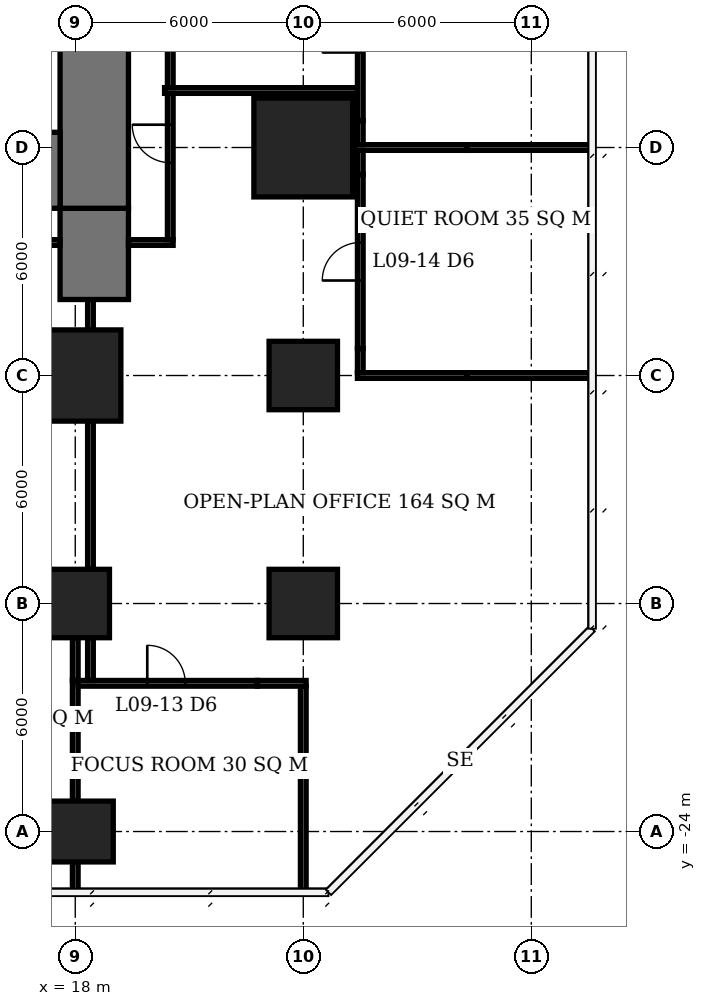
"""IFC4 building model, lengths in metres.
Left out: names, types, materials, properties, quantities, classifications, styles, units other than length and angle.
Written with IfcOpenShell. Run it as: python <this file> out.ifc"""

import sys

from ifc_helpers import new_model, si_unit, direction, frame, frame_2d, origin, origin_2d, place, context, subcontext, project, spatial, rectangle, extrude, element, fill, save


model = new_model("IFC4")
c1 = context("Model", 3, precision=1e-05, world=origin(), true_north=direction((0.0, 1.0)))
c2 = subcontext(c1, "Body", "Model", "MODEL_VIEW")
j1 = project(units=[si_unit("LENGTHUNIT", "METRE"), si_unit("PLANEANGLEUNIT", "RADIAN")], contexts=[c1])
p1 = place(None, origin())
s1 = spatial("IfcSite", under=j1, at=p1, CompositionType="ELEMENT")
p2 = place(p1, origin())
s2 = spatial("IfcBuilding", under=s1, at=p2, CompositionType="ELEMENT")
p3 = place(p2, frame((0.0, 0.0, 41.6)))
s3 = spatial("IfcBuildingStorey", under=s2, at=p3, CompositionType="ELEMENT", Elevation=41.6)
p4 = place(p3, frame((18.0, -24.0, 0.0), z_axis=(0.0, 0.0, 1.0), x_axis=(1.0, 0.0, 0.0)))
e1 = element("IfcColumn", 1, at=p4, inside=s3, PredefinedType="COLUMN", context=c2, shape_type="SweptSolid", body=[
    extrude(rectangle(XDim=2.0, YDim=1.6, at=origin_2d()), origin(), (0.0, 0.0, 1.0), 3.9),
])
p5 = place(p3, frame((18.0, -18.0, 0.0), z_axis=(0.0, 0.0, 1.0), x_axis=(1.0, 0.0, 0.0)))
e2 = element("IfcColumn", 2, at=p5, inside=s3, PredefinedType="COLUMN", context=c2, shape_type="SweptSolid", body=[
    extrude(rectangle(XDim=1.8, YDim=1.8, at=origin_2d()), origin(), (0.0, 0.0, 1.0), 3.9),
])
p6 = place(p3, frame((18.0, -12.0, 0.0), z_axis=(0.0, 0.0, 1.0), x_axis=(1.0, 0.0, 0.0)))
e3 = element("IfcColumn", 3, at=p6, inside=s3, PredefinedType="COLUMN", context=c2, shape_type="SweptSolid", body=[
    extrude(rectangle(XDim=2.4, YDim=2.4, at=origin_2d()), origin(), (0.0, 0.0, 1.0), 3.9),
])
for number, where, z_axis, x_axis in (
    (4, (24.0, -18.0, 0.0), (0.0, 0.0, 1.0), (1.0, 0.0, 0.0)),
    (5, (24.0, -12.0, 0.0), (0.0, 0.0, 1.0), (1.0, 0.0, 0.0)),
):
    element("IfcColumn", number, at=place(p3, frame(where, z_axis=z_axis, x_axis=x_axis)), inside=s3, PredefinedType="COLUMN", context=c2, shape_type="SweptSolid", body=[
        extrude(rectangle(XDim=1.8, YDim=1.8, at=origin_2d()), origin(), (0.0, 0.0, 1.0), 3.9),
    ])
p7 = place(p3, frame((24.0, -6.0, 0.0), z_axis=(0.0, 0.0, 1.0), x_axis=(1.0, 0.0, 0.0)))
e6 = element("IfcColumn", 6, at=p7, inside=s3, PredefinedType="COLUMN", context=c2, shape_type="SweptSolid", body=[
    extrude(rectangle(XDim=2.6, YDim=2.6, at=origin_2d()), origin(), (0.0, 0.0, 1.0), 3.9),
])
p8 = place(p3, frame((-5.6, -6.6, 0.0), z_axis=(0.0, 0.0, 1.0), x_axis=(1.0, 0.0, 0.0)))
e7 = element("IfcWall", 7, at=p8, inside=s3, PredefinedType="SHEAR", context=c2, shape_type="SweptSolid", body=[
    extrude(rectangle(XDim=23.2, YDim=2.0, at=frame_2d((11.6, 0.0))), origin(), (0.0, 0.0, 1.0), 3.9),
])
p9 = place(p3, frame((18.5, -7.6, 0.0), z_axis=(0.0, 0.0, 1.0), x_axis=(0.0, 1.0, 0.0)))
e8 = element("IfcWall", 8, at=p9, inside=s3, PredefinedType="SHEAR", context=c2, shape_type="SweptSolid", body=[
    extrude(rectangle(XDim=21.2, YDim=1.8, at=frame_2d((10.6, 0.0))), origin(), (0.0, 0.0, 1.0), 3.9),
])
p10 = place(p9, frame((9.2, 0.0, 0.0)))
e9 = element("IfcOpeningElement", 9, at=p10, cuts=e8, PredefinedType="OPENING", context=c2, shape_type="SweptSolid", body=[
    extrude(rectangle(XDim=1.8, YDim=2.4, at=frame_2d((0.9, 1.2))), frame((0.0, 0.91, 0.0), z_axis=(0.0, -1.0, 0.0), x_axis=(1.0, 0.0, 0.0)), (0.0, 0.0, 1.0), 1.82),
])
p11 = place(p3, frame((18.5, -10.0, 0.0), z_axis=(0.0, 0.0, 1.0), x_axis=(0.0, 1.0, 0.0)))
e10 = element("IfcWall", 10, at=p11, inside=s3, PredefinedType="SHEAR", context=c2, shape_type="SweptSolid", body=[
    extrude(rectangle(XDim=2.4, YDim=1.8, at=frame_2d((1.2, 0.0))), origin(), (0.0, 0.0, 1.0), 3.9),
])
p12 = place(p3, frame((18.075, -20.1, 0.0), z_axis=(0.0, 0.0, 1.0), x_axis=(1.0, 0.0, 0.0)))
e11 = element("IfcWall", 11, at=p12, inside=s3, PredefinedType="PARTITIONING", context=c2, shape_type="SweptSolid", body=[
    extrude(rectangle(XDim=4.715, YDim=0.15, at=frame_2d((2.357, 0.0))), origin(), (0.0, 0.0, 1.0), 3.65),
])
p13 = place(p12, frame((1.82, 0.0, 0.0)))
e12 = element("IfcOpeningElement", 12, at=p13, cuts=e11, PredefinedType="OPENING", context=c2, shape_type="SweptSolid", body=[
    extrude(rectangle(XDim=1.0, YDim=2.1, at=frame_2d((0.5, 1.05))), frame((0.0, 0.085, 0.0), z_axis=(0.0, -1.0, 0.0), x_axis=(1.0, 0.0, 0.0)), (0.0, 0.0, 1.0), 0.17),
])
p14 = place(p3, frame((22.79, -20.1, 0.0), z_axis=(0.0, 0.0, 1.0), x_axis=(1.0, 0.0, 0.0)))
e13 = element("IfcWall", 13, at=p14, inside=s3, PredefinedType="PARTITIONING", context=c2, shape_type="SweptSolid", body=[
    extrude(rectangle(XDim=1.285, YDim=0.15, at=frame_2d((0.643, 0.0))), origin(), (0.0, 0.0, 1.0), 2.65),
])
p15 = place(p3, frame((25.425, -12.0, 0.0), z_axis=(0.0, 0.0, 1.0), x_axis=(1.0, 0.0, 0.0)))
e14 = element("IfcWall", 14, at=p15, inside=s3, PredefinedType="PARTITIONING", context=c2, shape_type="SweptSolid", body=[
    extrude(rectangle(XDim=2.885, YDim=0.15, at=frame_2d((1.442, 0.0))), origin(), (0.0, 0.0, 1.0), 2.65),
])
p16 = place(p3, frame((28.31, -12.0, 0.0), z_axis=(0.0, 0.0, 1.0), x_axis=(1.0, 0.0, 0.0)))
e15 = element("IfcWall", 15, at=p16, inside=s3, PredefinedType="PARTITIONING", context=c2, shape_type="SweptSolid", body=[
    extrude(rectangle(XDim=3.29, YDim=0.15, at=frame_2d((1.645, 0.0))), origin(), (0.0, 0.0, 1.0), 3.65),
])
p17 = place(p3, frame((25.35, -6.0, 0.0), z_axis=(0.0, 0.0, 1.0), x_axis=(1.0, 0.0, 0.0)))
e16 = element("IfcWall", 16, at=p17, inside=s3, PredefinedType="PARTITIONING", context=c2, shape_type="SweptSolid", body=[
    extrude(rectangle(XDim=2.96, YDim=0.15, at=frame_2d((1.48, 0.0))), origin(), (0.0, 0.0, 1.0), 2.65),
])
p18 = place(p3, frame((28.31, -6.0, 0.0), z_axis=(0.0, 0.0, 1.0), x_axis=(1.0, 0.0, 0.0)))
e17 = element("IfcWall", 17, at=p18, inside=s3, PredefinedType="PARTITIONING", context=c2, shape_type="SweptSolid", body=[
    extrude(rectangle(XDim=3.29, YDim=0.15, at=frame_2d((1.645, 0.0))), origin(), (0.0, 0.0, 1.0), 3.65),
])
p19 = place(p3, frame((18.0, -25.6, 0.0), z_axis=(0.0, 0.0, 1.0), x_axis=(0.0, 1.0, 0.0)))
e18 = element("IfcWall", 18, at=p19, inside=s3, PredefinedType="PARTITIONING", context=c2, shape_type="SweptSolid", body=[
    extrude(rectangle(XDim=0.8, YDim=0.15, at=frame_2d((0.4, 0.0))), origin(), (0.0, 0.0, 1.0), 3.65),
])
p20 = place(p3, frame((18.0, -23.2, 0.0), z_axis=(0.0, 0.0, 1.0), x_axis=(0.0, 1.0, 0.0)))
e19 = element("IfcWall", 19, at=p20, inside=s3, PredefinedType="PARTITIONING", context=c2, shape_type="SweptSolid", body=[
    extrude(rectangle(XDim=3.175, YDim=0.15, at=frame_2d((1.587, 0.0))), origin(), (0.0, 0.0, 1.0), 3.65),
])
p21 = place(p3, frame((18.0, -20.025, 0.0), z_axis=(0.0, 0.0, 1.0), x_axis=(0.0, 1.0, 0.0)))
e20 = element("IfcWall", 20, at=p21, inside=s3, PredefinedType="PARTITIONING", context=c2, shape_type="SweptSolid", body=[
    extrude(rectangle(XDim=1.125, YDim=0.15, at=frame_2d((0.562, 0.0))), origin(), (0.0, 0.0, 1.0), 3.65),
])
p22 = place(p3, frame((24.0, -25.6, 0.0), z_axis=(0.0, 0.0, 1.0), x_axis=(0.0, 1.0, 0.0)))
e21 = element("IfcWall", 21, at=p22, inside=s3, PredefinedType="PARTITIONING", context=c2, shape_type="SweptSolid", body=[
    extrude(rectangle(XDim=3.555, YDim=0.15, at=frame_2d((1.778, 0.0))), origin(), (0.0, 0.0, 1.0), 3.65),
])
p23 = place(p3, frame((24.0, -22.045, 0.0), z_axis=(0.0, 0.0, 1.0), x_axis=(0.0, 1.0, 0.0)))
e22 = element("IfcWall", 22, at=p23, inside=s3, PredefinedType="PARTITIONING", context=c2, shape_type="SweptSolid", body=[
    extrude(rectangle(XDim=1.87, YDim=0.15, at=frame_2d((0.935, 0.0))), origin(), (0.0, 0.0, 1.0), 2.65),
])
p24 = place(p3, frame((25.5, -11.925, 0.0), z_axis=(0.0, 0.0, 1.0), x_axis=(0.0, 1.0, 0.0)))
e23 = element("IfcWall", 23, at=p24, inside=s3, PredefinedType="PARTITIONING", context=c2, shape_type="SweptSolid", body=[
    extrude(rectangle(XDim=0.635, YDim=0.15, at=frame_2d((0.317, 0.0))), origin(), (0.0, 0.0, 1.0), 2.65),
])
p25 = place(p3, frame((25.5, -11.29, 0.0), z_axis=(0.0, 0.0, 1.0), x_axis=(0.0, 1.0, 0.0)))
e24 = element("IfcWall", 24, at=p25, inside=s3, PredefinedType="PARTITIONING", context=c2, shape_type="SweptSolid", body=[
    extrude(rectangle(XDim=4.58, YDim=0.15, at=frame_2d((2.29, 0.0))), origin(), (0.0, 0.0, 1.0), 3.65),
])
p26 = place(p25, frame((1.79, 0.0, 0.0)))
e25 = element("IfcOpeningElement", 25, at=p26, cuts=e24, PredefinedType="OPENING", context=c2, shape_type="SweptSolid", body=[
    extrude(rectangle(XDim=1.0, YDim=2.1, at=frame_2d((0.5, 1.05))), frame((0.0, 0.085, 0.0), z_axis=(0.0, -1.0, 0.0), x_axis=(1.0, 0.0, 0.0)), (0.0, 0.0, 1.0), 0.17),
])
for number, where, z_axis, x_axis in (
    (26, (25.5, -6.71, 0.0), (0.0, 0.0, 1.0), (0.0, 1.0, 0.0)),
    (27, (25.5, -5.925, 0.0), (0.0, 0.0, 1.0), (0.0, 1.0, 0.0)),
):
    element("IfcWall", number, at=place(p3, frame(where, z_axis=z_axis, x_axis=x_axis)), inside=s3, PredefinedType="PARTITIONING", context=c2, shape_type="SweptSolid", body=[
        extrude(rectangle(XDim=0.635, YDim=0.15, at=frame_2d((0.317, 0.0))), origin(), (0.0, 0.0, 1.0), 2.65),
    ])
p27 = place(p3, frame((25.5, -5.29, 0.0), z_axis=(0.0, 0.0, 1.0), x_axis=(0.0, 1.0, 0.0)))
e28 = element("IfcWall", 28, at=p27, inside=s3, PredefinedType="PARTITIONING", context=c2, shape_type="SweptSolid", body=[
    extrude(rectangle(XDim=4.58, YDim=0.15, at=frame_2d((2.29, 0.0))), origin(), (0.0, 0.0, 1.0), 3.65),
])
p28 = place(p27, frame((1.79, 0.0, 0.0)))
e29 = element("IfcOpeningElement", 29, at=p28, cuts=e28, PredefinedType="OPENING", context=c2, shape_type="SweptSolid", body=[
    extrude(rectangle(XDim=1.0, YDim=2.1, at=frame_2d((0.5, 1.05))), frame((0.0, 0.085, 0.0), z_axis=(0.0, -1.0, 0.0), x_axis=(1.0, 0.0, 0.0)), (0.0, 0.0, 1.0), 0.17),
])
p29 = place(p3, frame((17.6, -8.5, 0.0), z_axis=(0.0, 0.0, 1.0), x_axis=(-1.0, 0.0, 0.0)))
e30 = element("IfcWall", 30, at=p29, inside=s3, PredefinedType="PARTITIONING", context=c2, shape_type="SweptSolid", body=[
    extrude(rectangle(XDim=16.025, YDim=0.15, at=frame_2d((8.013, 0.0))), origin(), (0.0, 0.0, 1.0), 3.65),
])
p30 = place(p29, frame((9.965, 0.0, 0.0)))
e31 = element("IfcOpeningElement", 31, at=p30, cuts=e30, PredefinedType="OPENING", context=c2, shape_type="SweptSolid", body=[
    extrude(rectangle(XDim=1.0, YDim=2.1, at=frame_2d((0.5, 1.05))), frame((0.0, 0.085, 0.0), z_axis=(0.0, -1.0, 0.0), x_axis=(1.0, 0.0, 0.0)), (0.0, 0.0, 1.0), 0.17),
])
p31 = place(p3, frame((18.4, -20.025, 0.0), z_axis=(0.0, 0.0, 1.0), x_axis=(0.0, 1.0, 0.0)))
e32 = element("IfcWall", 32, at=p31, inside=s3, PredefinedType="PARTITIONING", context=c2, shape_type="SweptSolid", body=[
    extrude(rectangle(XDim=1.125, YDim=0.15, at=frame_2d((0.562, 0.0))), origin(), (0.0, 0.0, 1.0), 3.65),
])
p32 = place(p3, frame((18.4, -17.1, 0.0), z_axis=(0.0, 0.0, 1.0), x_axis=(0.0, 1.0, 0.0)))
e33 = element("IfcWall", 33, at=p32, inside=s3, PredefinedType="PARTITIONING", context=c2, shape_type="SweptSolid", body=[
    extrude(rectangle(XDim=3.9, YDim=0.15, at=frame_2d((1.95, 0.0))), origin(), (0.0, 0.0, 1.0), 3.65),
])
p33 = place(p3, frame((18.4, -10.8, 0.0), z_axis=(0.0, 0.0, 1.0), x_axis=(0.0, 1.0, 0.0)))
e34 = element("IfcWall", 34, at=p33, inside=s3, PredefinedType="PARTITIONING", context=c2, shape_type="SweptSolid", body=[
    extrude(rectangle(XDim=0.8, YDim=0.15, at=frame_2d((0.4, 0.0))), origin(), (0.0, 0.0, 1.0), 3.65),
])
p34 = place(p3, frame((19.4, -8.5, 0.0), z_axis=(0.0, 0.0, 1.0), x_axis=(1.0, 0.0, 0.0)))
e35 = element("IfcWall", 35, at=p34, inside=s3, PredefinedType="PARTITIONING", context=c2, shape_type="SweptSolid", body=[
    extrude(rectangle(XDim=1.175, YDim=0.15, at=frame_2d((0.587, 0.0))), origin(), (0.0, 0.0, 1.0), 3.65),
])
p35 = place(p3, frame((20.5, -8.425, 0.0), z_axis=(0.0, 0.0, 1.0), x_axis=(0.0, 1.0, 0.0)))
e36 = element("IfcWall", 36, at=p35, inside=s3, PredefinedType="PARTITIONING", context=c2, shape_type="SweptSolid", body=[
    extrude(rectangle(XDim=3.85, YDim=0.15, at=frame_2d((1.925, 0.0))), origin(), (0.0, 0.0, 1.0), 3.65),
])
p36 = place(p35, frame((2.025, 0.0, 0.0)))
e37 = element("IfcOpeningElement", 37, at=p36, cuts=e36, PredefinedType="OPENING", context=c2, shape_type="SweptSolid", body=[
    extrude(rectangle(XDim=1.0, YDim=2.1, at=frame_2d((0.5, 1.05))), frame((0.0, 0.085, 0.0), z_axis=(0.0, -1.0, 0.0), x_axis=(1.0, 0.0, 0.0)), (0.0, 0.0, 1.0), 0.17),
])
p37 = place(p3, frame((20.5, -4.425, 0.0), z_axis=(0.0, 0.0, 1.0), x_axis=(0.0, 1.0, 0.0)))
e38 = element("IfcWall", 38, at=p37, inside=s3, PredefinedType="PARTITIONING", context=c2, shape_type="SweptSolid", body=[
    extrude(rectangle(XDim=18.85, YDim=0.15, at=frame_2d((9.425, 0.0))), origin(), (0.0, 0.0, 1.0), 3.65),
])
p38 = place(p37, frame((11.775, 0.0, 0.0)))
e39 = element("IfcOpeningElement", 39, at=p38, cuts=e38, PredefinedType="OPENING", context=c2, shape_type="SweptSolid", body=[
    extrude(rectangle(XDim=1.0, YDim=2.1, at=frame_2d((0.5, 1.05))), frame((0.0, 0.085, 0.0), z_axis=(0.0, -1.0, 0.0), x_axis=(1.0, 0.0, 0.0)), (0.0, 0.0, 1.0), 0.17),
])
p39 = place(p3, frame((20.35, -4.5, 0.0), z_axis=(0.0, 0.0, 1.0), x_axis=(1.0, 0.0, 0.0)))
e40 = element("IfcWall", 40, at=p39, inside=s3, PredefinedType="PARTITIONING", context=c2, shape_type="SweptSolid", body=[
    extrude(rectangle(XDim=5.075, YDim=0.15, at=frame_2d((2.538, 0.0))), origin(), (0.0, 0.0, 1.0), 3.65),
])
p40 = place(p13, origin())
e41 = element("IfcDoor", 41, at=p40, inside=s3, OperationType="SINGLE_SWING_LEFT", PredefinedType="DOOR", context=c2, shape_type="SweptSolid", body=[
    extrude(rectangle(XDim=1.0, YDim=2.1, at=frame_2d((0.5, 1.05))), frame((0.0, 0.025, 0.0), z_axis=(0.0, -1.0, 0.0), x_axis=(1.0, 0.0, 0.0)), (0.0, 0.0, 1.0), 0.05),
])
fill(e12, e41)
p41 = place(p26, origin())
e42 = element("IfcDoor", 42, at=p41, inside=s3, OperationType="SINGLE_SWING_LEFT", PredefinedType="DOOR", context=c2, shape_type="SweptSolid", body=[
    extrude(rectangle(XDim=1.0, YDim=2.1, at=frame_2d((0.5, 1.05))), frame((0.0, 0.025, 0.0), z_axis=(0.0, -1.0, 0.0), x_axis=(1.0, 0.0, 0.0)), (0.0, 0.0, 1.0), 0.05),
])
fill(e25, e42)
p42 = place(p36, origin())
e43 = element("IfcDoor", 43, at=p42, inside=s3, OperationType="SINGLE_SWING_RIGHT", PredefinedType="DOOR", context=c2, shape_type="SweptSolid", body=[
    extrude(rectangle(XDim=1.0, YDim=2.1, at=frame_2d((0.5, 1.05))), frame((0.0, 0.025, 0.0), z_axis=(0.0, -1.0, 0.0), x_axis=(1.0, 0.0, 0.0)), (0.0, 0.0, 1.0), 0.05),
])
fill(e37, e43)
save(model, sys.argv[1])
